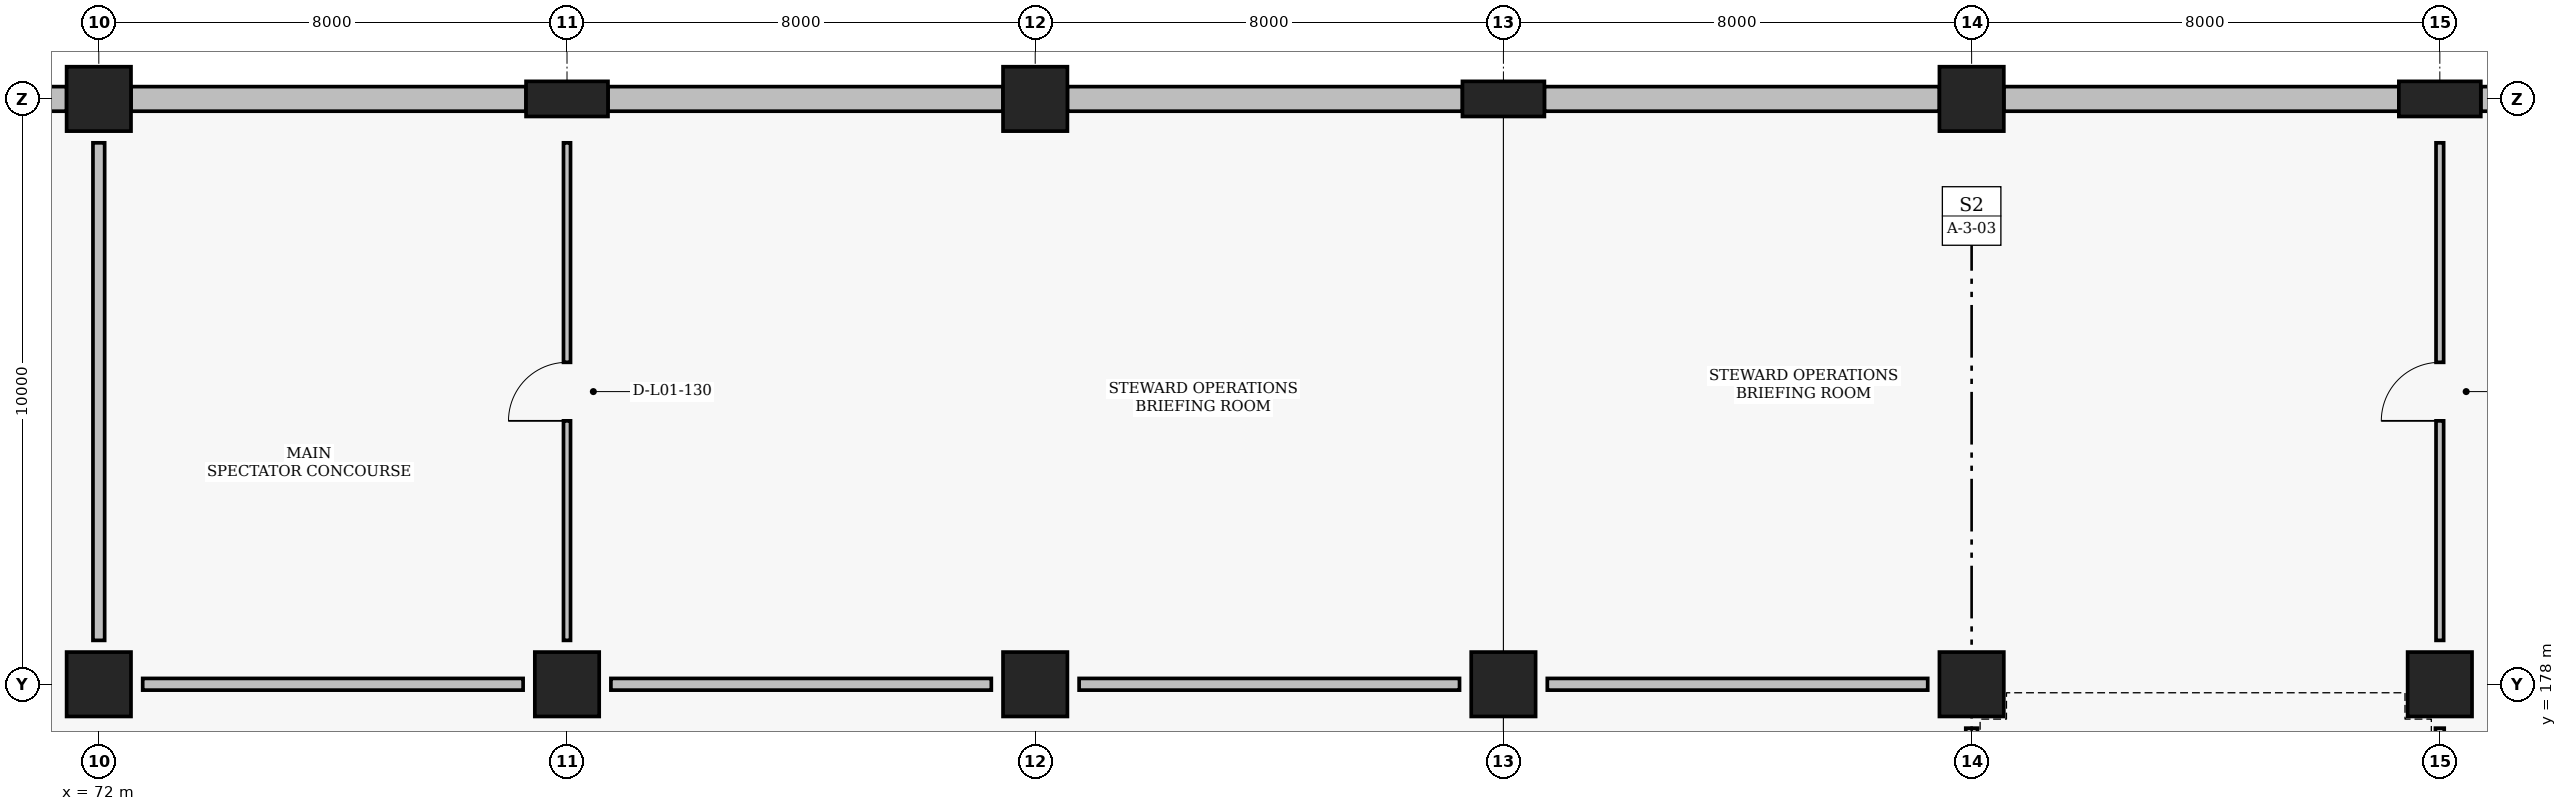
"""IFC4 building model, lengths in metres.
Left out: names, types, materials, properties, quantities, classifications, styles, units other than length and angle.
Written with IfcOpenShell. Run it as: python <this file> out.ifc"""

import sys

from ifc_helpers import new_model, si_unit, direction, frame, frame_2d, origin, origin_2d, place, context, subcontext, project, spatial, rectangle, extrude, element, fill, save


model = new_model("IFC4")
c1 = context("Model", 3, precision=1e-05, world=origin(), true_north=direction((0.0, 1.0)))
c2 = subcontext(c1, "Body", "Model", "MODEL_VIEW")
j1 = project(units=[si_unit("LENGTHUNIT", "METRE"), si_unit("PLANEANGLEUNIT", "RADIAN")], contexts=[c1])
p1 = place(None, origin())
s1 = spatial("IfcSite", under=j1, at=p1, CompositionType="ELEMENT")
p2 = place(p1, origin())
s2 = spatial("IfcBuilding", under=s1, at=p2, CompositionType="ELEMENT")
p3 = place(p2, origin())
s3 = spatial("IfcBuildingStorey", under=s2, at=p3, CompositionType="ELEMENT", Elevation=0.0)
for number, where, z_axis, x_axis in (
    (1, (72.0, 178.0, 0.0), (0.0, 0.0, 1.0), (1.0, 0.0, 0.0)),
    (2, (72.0, 188.0, 0.0), (0.0, 0.0, 1.0), (1.0, 0.0, 0.0)),
    (3, (80.0, 178.0, 0.0), (0.0, 0.0, 1.0), (1.0, 0.0, 0.0)),
):
    element("IfcColumn", number, at=place(p3, frame(where, z_axis=z_axis, x_axis=x_axis)), inside=s3, PredefinedType="COLUMN", context=c2, shape_type="SweptSolid", body=[
        extrude(rectangle(XDim=1.1, YDim=1.1, at=origin_2d()), origin(), (0.0, 0.0, 1.0), 4.8),
    ])
p4 = place(p3, frame((80.0, 188.0, 0.0), z_axis=(0.0, 0.0, 1.0), x_axis=(0.0, 1.0, 0.0)))
e4 = element("IfcColumn", 4, at=p4, inside=s3, PredefinedType="PILASTER", context=c2, shape_type="SweptSolid", body=[
    extrude(rectangle(XDim=0.6, YDim=1.4, at=origin_2d()), origin(), (0.0, 0.0, 1.0), 4.8),
])
for number, where, z_axis, x_axis in (
    (5, (88.0, 178.0, 0.0), (0.0, 0.0, 1.0), (1.0, 0.0, 0.0)),
    (6, (88.0, 188.0, 0.0), (0.0, 0.0, 1.0), (1.0, 0.0, 0.0)),
    (7, (96.0, 178.0, 0.0), (0.0, 0.0, 1.0), (1.0, 0.0, 0.0)),
):
    element("IfcColumn", number, at=place(p3, frame(where, z_axis=z_axis, x_axis=x_axis)), inside=s3, PredefinedType="COLUMN", context=c2, shape_type="SweptSolid", body=[
        extrude(rectangle(XDim=1.1, YDim=1.1, at=origin_2d()), origin(), (0.0, 0.0, 1.0), 4.8),
    ])
p5 = place(p3, frame((96.0, 188.0, 0.0), z_axis=(0.0, 0.0, 1.0), x_axis=(0.0, 1.0, 0.0)))
e8 = element("IfcColumn", 8, at=p5, inside=s3, PredefinedType="PILASTER", context=c2, shape_type="SweptSolid", body=[
    extrude(rectangle(XDim=0.6, YDim=1.4, at=origin_2d()), origin(), (0.0, 0.0, 1.0), 4.8),
])
for number, where, z_axis, x_axis in (
    (9, (104.0, 178.0, 0.0), (0.0, 0.0, 1.0), (1.0, 0.0, 0.0)),
    (10, (104.0, 188.0, 0.0), (0.0, 0.0, 1.0), (1.0, 0.0, 0.0)),
    (11, (112.0, 178.0, 0.0), (0.0, 0.0, 1.0), (1.0, 0.0, 0.0)),
):
    element("IfcColumn", number, at=place(p3, frame(where, z_axis=z_axis, x_axis=x_axis)), inside=s3, PredefinedType="COLUMN", context=c2, shape_type="SweptSolid", body=[
        extrude(rectangle(XDim=1.1, YDim=1.1, at=origin_2d()), origin(), (0.0, 0.0, 1.0), 4.8),
    ])
p6 = place(p3, frame((112.0, 188.0, 0.0), z_axis=(0.0, 0.0, 1.0), x_axis=(0.0, 1.0, 0.0)))
e12 = element("IfcColumn", 12, at=p6, inside=s3, PredefinedType="PILASTER", context=c2, shape_type="SweptSolid", body=[
    extrude(rectangle(XDim=0.6, YDim=1.4, at=origin_2d()), origin(), (0.0, 0.0, 1.0), 4.8),
])
for number, where, z_axis, x_axis in (
    (13, (64.7, 188.0, 0.0), (0.0, 0.0, 1.0), (1.0, 0.0, 0.0)),
    (14, (72.55, 188.0, 0.0), (0.0, 0.0, 1.0), (1.0, 0.0, 0.0)),
    (15, (80.7, 188.0, 0.0), (0.0, 0.0, 1.0), (1.0, 0.0, 0.0)),
    (16, (88.55, 188.0, 0.0), (0.0, 0.0, 1.0), (1.0, 0.0, 0.0)),
    (17, (96.7, 188.0, 0.0), (0.0, 0.0, 1.0), (1.0, 0.0, 0.0)),
    (18, (104.55, 188.0, 0.0), (0.0, 0.0, 1.0), (1.0, 0.0, 0.0)),
    (19, (112.7, 188.0, 0.0), (0.0, 0.0, 1.0), (1.0, 0.0, 0.0)),
):
    element("IfcWall", number, at=place(p3, frame(where, z_axis=z_axis, x_axis=x_axis)), inside=s3, PredefinedType="SOLIDWALL", context=c2, shape_type="SweptSolid", body=[
        extrude(rectangle(XDim=6.75, YDim=0.42, at=frame_2d((3.375, 0.0))), origin(), (0.0, 0.0, 1.0), 3.77),
    ])
p7 = place(p3, frame((72.0, 178.75, 0.0), z_axis=(0.0, 0.0, 1.0), x_axis=(0.0, 1.0, 0.0)))
e20 = element("IfcWall", 20, at=p7, inside=s3, PredefinedType="PARTITIONING", context=c2, shape_type="SweptSolid", body=[
    extrude(rectangle(XDim=8.5, YDim=0.2, at=frame_2d((4.25, 0.0))), origin(), (0.0, 0.0, 1.0), 3.77),
])
for number, where, z_axis, x_axis in (
    (21, (72.75, 178.0, 0.0), (0.0, 0.0, 1.0), (1.0, 0.0, 0.0)),
    (22, (80.75, 178.0, 0.0), (0.0, 0.0, 1.0), (1.0, 0.0, 0.0)),
    (23, (88.75, 178.0, 0.0), (0.0, 0.0, 1.0), (1.0, 0.0, 0.0)),
):
    element("IfcWall", number, at=place(p3, frame(where, z_axis=z_axis, x_axis=x_axis)), inside=s3, PredefinedType="PARTITIONING", context=c2, shape_type="SweptSolid", body=[
        extrude(rectangle(XDim=6.5, YDim=0.2, at=frame_2d((3.25, 0.0))), origin(), (0.0, 0.0, 1.0), 3.91),
    ])
p8 = place(p3, frame((104.0, 168.75, 0.0), z_axis=(0.0, 0.0, 1.0), x_axis=(0.0, 1.0, 0.0)))
e24 = element("IfcWall", 24, at=p8, inside=s3, PredefinedType="PARTITIONING", context=c2, shape_type="SweptSolid", body=[
    extrude(rectangle(XDim=8.5, YDim=0.2, at=frame_2d((4.25, 0.0))), origin(), (0.0, 0.0, 1.0), 3.71),
])
p9 = place(p3, frame((96.75, 178.0, 0.0), z_axis=(0.0, 0.0, 1.0), x_axis=(1.0, 0.0, 0.0)))
e25 = element("IfcWall", 25, at=p9, inside=s3, PredefinedType="PARTITIONING", context=c2, shape_type="SweptSolid", body=[
    extrude(rectangle(XDim=6.5, YDim=0.2, at=frame_2d((3.25, 0.0))), origin(), (0.0, 0.0, 1.0), 3.91),
])
p10 = place(p3, frame((80.0, 178.75, 0.0), z_axis=(0.0, 0.0, 1.0), x_axis=(0.0, 1.0, 0.0)))
e26 = element("IfcWall", 26, at=p10, inside=s3, PredefinedType="PARTITIONING", context=c2, shape_type="SweptSolid", body=[
    extrude(rectangle(XDim=8.5, YDim=0.12, at=frame_2d((4.25, 0.0))), origin(), (0.0, 0.0, 1.0), 3.77),
])
p11 = place(p10, frame((3.75, 0.0, 0.0)))
e27 = element("IfcOpeningElement", 27, at=p11, cuts=e26, PredefinedType="OPENING", context=c2, shape_type="SweptSolid", body=[
    extrude(rectangle(XDim=1.0, YDim=2.1, at=frame_2d((0.5, 1.05))), frame((0.0, 0.07, 0.0), z_axis=(0.0, -1.0, 0.0), x_axis=(1.0, 0.0, 0.0)), (0.0, 0.0, 1.0), 0.14),
])
p12 = place(p3, frame((112.0, 178.75, 0.0), z_axis=(0.0, 0.0, 1.0), x_axis=(0.0, 1.0, 0.0)))
e28 = element("IfcWall", 28, at=p12, inside=s3, PredefinedType="PARTITIONING", context=c2, shape_type="SweptSolid", body=[
    extrude(rectangle(XDim=8.5, YDim=0.13, at=frame_2d((4.25, 0.0))), origin(), (0.0, 0.0, 1.0), 3.77),
])
p13 = place(p12, frame((3.75, 0.0, 0.0)))
e29 = element("IfcOpeningElement", 29, at=p13, cuts=e28, PredefinedType="OPENING", context=c2, shape_type="SweptSolid", body=[
    extrude(rectangle(XDim=1.0, YDim=2.1, at=frame_2d((0.5, 1.05))), frame((0.0, 0.075, 0.0), z_axis=(0.0, -1.0, 0.0), x_axis=(1.0, 0.0, 0.0)), (0.0, 0.0, 1.0), 0.15),
])
p14 = place(p3, frame((112.0, 168.75, 0.0), z_axis=(0.0, 0.0, 1.0), x_axis=(0.0, 1.0, 0.0)))
e30 = element("IfcWall", 30, at=p14, inside=s3, PredefinedType="PARTITIONING", context=c2, shape_type="SweptSolid", body=[
    extrude(rectangle(XDim=8.5, YDim=0.15, at=frame_2d((4.25, 0.0))), origin(), (0.0, 0.0, 1.0), 3.71),
])
p15 = place(p14, frame((3.35, 0.0, 0.0)))
e31 = element("IfcOpeningElement", 31, at=p15, cuts=e30, PredefinedType="OPENING", context=c2, shape_type="SweptSolid", body=[
    extrude(rectangle(XDim=1.8, YDim=2.3, at=frame_2d((0.9, 1.15))), frame((0.0, 0.085, 0.0), z_axis=(0.0, -1.0, 0.0), x_axis=(1.0, 0.0, 0.0)), (0.0, 0.0, 1.0), 0.17),
])
p16 = place(p11, origin())
e32 = element("IfcDoor", 32, at=p16, inside=s3, OperationType="SINGLE_SWING_LEFT", PredefinedType="DOOR", context=c2, shape_type="SweptSolid", body=[
    extrude(rectangle(XDim=1.0, YDim=2.1, at=frame_2d((0.5, 1.05))), frame((0.0, 0.025, 0.0), z_axis=(0.0, -1.0, 0.0), x_axis=(1.0, 0.0, 0.0)), (0.0, 0.0, 1.0), 0.05),
])
fill(e27, e32)
p17 = place(p13, origin())
e33 = element("IfcDoor", 33, at=p17, inside=s3, OperationType="SINGLE_SWING_LEFT", PredefinedType="DOOR", context=c2, shape_type="SweptSolid", body=[
    extrude(rectangle(XDim=1.0, YDim=2.1, at=frame_2d((0.5, 1.05))), frame((0.0, 0.025, 0.0), z_axis=(0.0, -1.0, 0.0), x_axis=(1.0, 0.0, 0.0)), (0.0, 0.0, 1.0), 0.05),
])
fill(e29, e33)
save(model, sys.argv[1])
